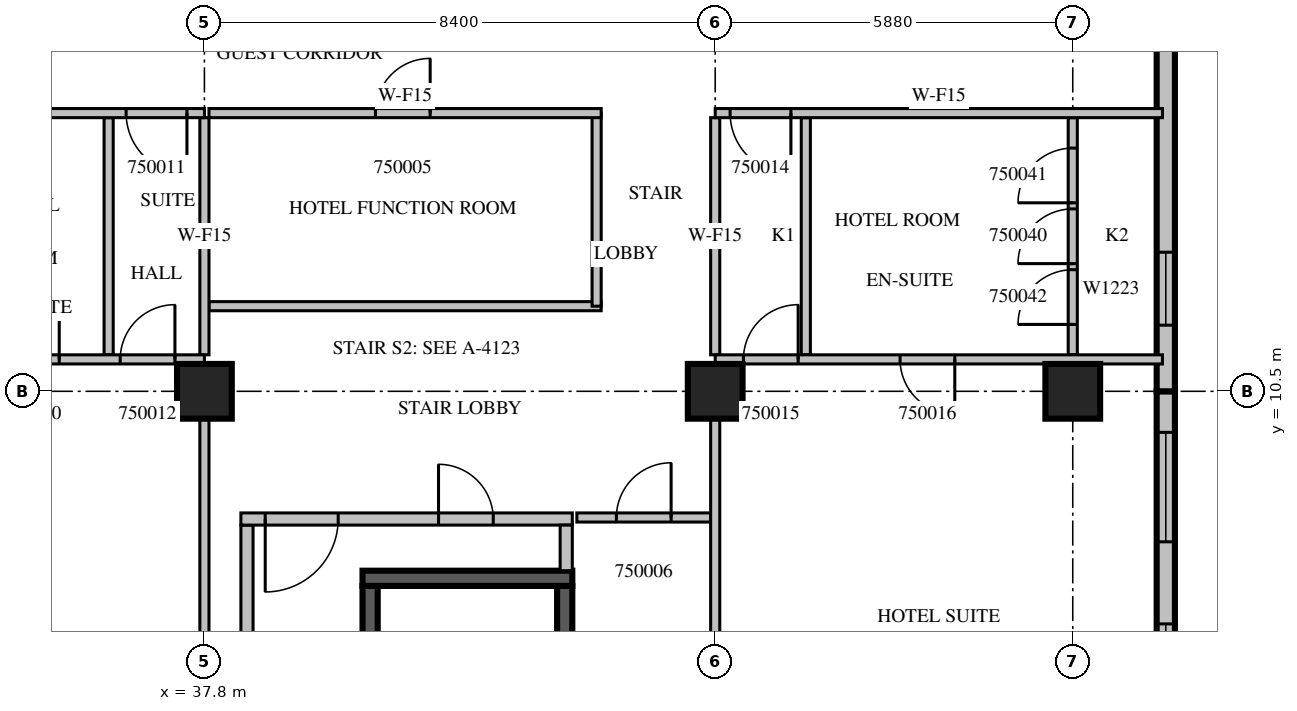
"""IFC4 building model, lengths in metres.
Left out: names, types, materials, properties, quantities, classifications, styles, units other than length and angle.
Written with IfcOpenShell. Run it as: python <this file> out.ifc"""

import sys

from ifc_helpers import new_model, si_unit, direction, frame, frame_2d, origin, origin_2d, place, context, subcontext, project, spatial, rectangle, extrude, source, transform, mapped, element, fill, save


model = new_model("IFC4")
c1 = context("Model", 3, precision=1e-05, world=origin(), true_north=direction((0.0, 1.0)))
c2 = subcontext(c1, "Body", "Model", "MODEL_VIEW")
j1 = project(units=[si_unit("LENGTHUNIT", "METRE"), si_unit("PLANEANGLEUNIT", "RADIAN")], contexts=[c1])
p1 = place(None, origin())
s1 = spatial("IfcSite", under=j1, at=p1, CompositionType="ELEMENT")
p2 = place(p1, origin())
s2 = spatial("IfcBuilding", under=s1, at=p2, CompositionType="ELEMENT")
p3 = place(p2, frame((0.0, 0.0, 223.4)))
s3 = spatial("IfcBuildingStorey", under=s2, at=p3, CompositionType="ELEMENT", Elevation=223.4)
m1 = source(origin(), c2, "Body", "SweptSolid", [
    extrude(rectangle(XDim=0.9, YDim=0.9, at=origin_2d()), origin(), (0.0, 0.0, 1.0), 3.8),
])
for number, where, z_axis, x_axis in (
    (1, (37.8, 10.5, 0.0), (0.0, 0.0, 1.0), (1.0, 0.0, 0.0)),
    (2, (46.2, 10.5, 0.0), (0.0, 0.0, 1.0), (1.0, 0.0, 0.0)),
    (3, (52.08, 10.5, 0.0), (0.0, 0.0, 1.0), (1.0, 0.0, 0.0)),
):
    element("IfcColumn", number, at=place(p3, frame(where, z_axis=z_axis, x_axis=x_axis)), inside=s3, PredefinedType="COLUMN", context=c2, shape_type="MappedRepresentation", body=[
        mapped(m1, transform((0.0, 0.0, 0.0), scale=1.0)),
    ])
m2 = source(origin(), c2, "Body", "SweptSolid", [
    extrude(rectangle(XDim=6.3, YDim=0.3, at=frame_2d((3.15, 0.0))), origin(), (0.0, 0.0, 1.0), 3.4),
])
p4 = place(p3, frame((53.61, 4.2, 0.0), z_axis=(0.0, 0.0, 1.0), x_axis=(0.0, 1.0, 0.0)))
e4 = element("IfcWall", 4, at=p4, inside=s3, PredefinedType="STANDARD", context=c2, shape_type="MappedRepresentation", body=[
    mapped(m2, transform((0.0, 0.0, 0.0), scale=1.0)),
])
m3 = source(origin(), c2, "Body", "SweptSolid", [
    extrude(rectangle(XDim=1.8, YDim=2.3, at=frame_2d((0.9, 1.15))), frame((0.0, 0.16, 0.0), z_axis=(0.0, -1.0, 0.0), x_axis=(1.0, 0.0, 0.0)), (0.0, 0.0, 1.0), 0.32),
])
p5 = place(p4, frame((0.675, 0.0, 0.6)))
e5 = element("IfcOpeningElement", 5, at=p5, cuts=e4, PredefinedType="OPENING", context=c2, shape_type="MappedRepresentation", body=[
    mapped(m3, transform((0.0, 0.0, 0.0), scale=1.0)),
])
p6 = place(p4, frame((3.825, 0.0, 0.6)))
e6 = element("IfcOpeningElement", 6, at=p6, cuts=e4, PredefinedType="OPENING", context=c2, shape_type="MappedRepresentation", body=[
    mapped(m3, transform((0.0, 0.0, 0.0), scale=1.0)),
])
m4 = source(origin(), c2, "Body", "SweptSolid", [
    extrude(rectangle(XDim=6.75, YDim=0.3, at=frame_2d((3.375, 0.0))), origin(), (0.0, 0.0, 1.0), 3.4),
])
p7 = place(p3, frame((53.61, 10.5, 0.0), z_axis=(0.0, 0.0, 1.0), x_axis=(0.0, 1.0, 0.0)))
e7 = element("IfcWall", 7, at=p7, inside=s3, PredefinedType="STANDARD", context=c2, shape_type="MappedRepresentation", body=[
    mapped(m4, transform((0.0, 0.0, 0.0), scale=1.0)),
])
m5 = source(origin(), c2, "Body", "SweptSolid", [
    extrude(rectangle(XDim=1.2, YDim=2.3, at=frame_2d((0.6, 1.15))), frame((0.0, 0.16, 0.0), z_axis=(0.0, -1.0, 0.0), x_axis=(1.0, 0.0, 0.0)), (0.0, 0.0, 1.0), 0.32),
])
p8 = place(p7, frame((1.087, 0.0, 0.6)))
e8 = element("IfcOpeningElement", 8, at=p8, cuts=e7, PredefinedType="OPENING", context=c2, shape_type="MappedRepresentation", body=[
    mapped(m5, transform((0.0, 0.0, 0.0), scale=1.0)),
])
m6 = source(origin(), c2, "Body", "SweptSolid", [
    extrude(rectangle(XDim=7.0, YDim=0.25, at=frame_2d((3.5, 0.0))), origin(), (0.0, 0.0, 1.0), 3.4),
])
p9 = place(p3, frame((40.525, 0.3, 0.0), z_axis=(0.0, 0.0, 1.0), x_axis=(0.0, 1.0, 0.0)))
e9 = element("IfcWall", 9, at=p9, inside=s3, PredefinedType="SOLIDWALL", context=c2, shape_type="MappedRepresentation", body=[
    mapped(m6, transform((0.0, 0.0, 0.0), scale=1.0)),
])
m7 = source(origin(), c2, "Body", "SweptSolid", [
    extrude(rectangle(XDim=1.1, YDim=2.1, at=frame_2d((0.55, 1.05))), frame((0.0, 0.135, 0.0), z_axis=(0.0, -1.0, 0.0), x_axis=(1.0, 0.0, 0.0)), (0.0, 0.0, 1.0), 0.27),
])
p10 = place(p9, frame((0.55, 0.0, 0.0)))
e10 = element("IfcOpeningElement", 10, at=p10, cuts=e9, PredefinedType="OPENING", context=c2, shape_type="MappedRepresentation", body=[
    mapped(m7, transform((0.0, 0.0, 0.0), scale=1.0)),
])
p11 = place(p3, frame((43.725, 0.3, 0.0), z_axis=(0.0, 0.0, 1.0), x_axis=(0.0, 1.0, 0.0)))
e11 = element("IfcWall", 11, at=p11, inside=s3, PredefinedType="SOLIDWALL", context=c2, shape_type="MappedRepresentation", body=[
    mapped(m6, transform((0.0, 0.0, 0.0), scale=1.0)),
])
m8 = source(origin(), c2, "Body", "SweptSolid", [
    extrude(rectangle(XDim=3.45, YDim=0.25, at=frame_2d((1.725, 0.0))), origin(), (0.0, 0.0, 1.0), 3.4),
])
p12 = place(p3, frame((40.4, 7.425, 0.0), z_axis=(0.0, 0.0, 1.0), x_axis=(1.0, 0.0, 0.0)))
e12 = element("IfcWall", 12, at=p12, inside=s3, PredefinedType="SOLIDWALL", context=c2, shape_type="MappedRepresentation", body=[
    mapped(m8, transform((0.0, 0.0, 0.0), scale=1.0)),
])
m9 = source(origin(), c2, "Body", "SweptSolid", [
    extrude(rectangle(XDim=8.0, YDim=0.2, at=frame_2d((4.0, 0.0))), origin(), (0.0, 0.0, 1.0), 3.4),
])
p13 = place(p3, frame((38.5, 0.3, 0.0), z_axis=(0.0, 0.0, 1.0), x_axis=(0.0, 1.0, 0.0)))
e13 = element("IfcWall", 13, at=p13, inside=s3, PredefinedType="PARTITIONING", context=c2, shape_type="MappedRepresentation", body=[
    mapped(m9, transform((0.0, 0.0, 0.0), scale=1.0)),
])
m10 = source(origin(), c2, "Body", "SweptSolid", [
    extrude(rectangle(XDim=5.45, YDim=0.2, at=frame_2d((2.725, 0.0))), origin(), (0.0, 0.0, 1.0), 3.4),
])
p14 = place(p3, frame((38.4, 8.4, 0.0), z_axis=(0.0, 0.0, 1.0), x_axis=(1.0, 0.0, 0.0)))
e14 = element("IfcWall", 14, at=p14, inside=s3, PredefinedType="PARTITIONING", context=c2, shape_type="MappedRepresentation", body=[
    mapped(m10, transform((0.0, 0.0, 0.0), scale=1.0)),
])
m11 = source(origin(), c2, "Body", "SweptSolid", [
    extrude(rectangle(XDim=1.2, YDim=2.1, at=frame_2d((0.6, 1.05))), frame((0.0, 0.11, 0.0), z_axis=(0.0, -1.0, 0.0), x_axis=(1.0, 0.0, 0.0)), (0.0, 0.0, 1.0), 0.22),
])
p15 = place(p14, frame((0.4, 0.0, 0.0)))
e15 = element("IfcOpeningElement", 15, at=p15, cuts=e14, PredefinedType="OPENING", context=c2, shape_type="MappedRepresentation", body=[
    mapped(m11, transform((0.0, 0.0, 0.0), scale=1.0)),
])
m12 = source(origin(), c2, "Body", "SweptSolid", [
    extrude(rectangle(XDim=0.9, YDim=2.1, at=frame_2d((0.45, 1.05))), frame((0.0, 0.11, 0.0), z_axis=(0.0, -1.0, 0.0), x_axis=(1.0, 0.0, 0.0)), (0.0, 0.0, 1.0), 0.22),
])
p16 = place(p14, frame((3.25, 0.0, 0.0)))
e16 = element("IfcOpeningElement", 16, at=p16, cuts=e14, PredefinedType="OPENING", context=c2, shape_type="MappedRepresentation", body=[
    mapped(m12, transform((0.0, 0.0, 0.0), scale=1.0)),
])
m13 = source(origin(), c2, "Body", "SweptSolid", [
    extrude(rectangle(XDim=0.75, YDim=0.2, at=frame_2d((0.375, 0.0))), origin(), (0.0, 0.0, 1.0), 3.4),
])
p17 = place(p3, frame((43.75, 7.55, 0.0), z_axis=(0.0, 0.0, 1.0), x_axis=(0.0, 1.0, 0.0)))
e17 = element("IfcWall", 17, at=p17, inside=s3, PredefinedType="PARTITIONING", context=c2, shape_type="MappedRepresentation", body=[
    mapped(m13, transform((0.0, 0.0, 0.0), scale=1.0)),
])
m14 = source(origin(), c2, "Body", "SweptSolid", [
    extrude(rectangle(XDim=6.45, YDim=0.15, at=frame_2d((3.225, 0.0))), origin(), (0.0, 0.0, 1.0), 3.4),
])
p18 = place(p3, frame((37.875, 11.9, 0.0), z_axis=(0.0, 0.0, 1.0), x_axis=(1.0, 0.0, 0.0)))
e18 = element("IfcWall", 18, at=p18, inside=s3, PredefinedType="PARTITIONING", context=c2, shape_type="MappedRepresentation", body=[
    mapped(m14, transform((0.0, 0.0, 0.0), scale=1.0)),
])
m15 = source(origin(), c2, "Body", "SweptSolid", [
    extrude(rectangle(XDim=3.175, YDim=0.15, at=frame_2d((1.587, 0.0))), origin(), (0.0, 0.0, 1.0), 3.4),
])
p19 = place(p3, frame((44.25, 11.9, 0.0), z_axis=(0.0, 0.0, 1.0), x_axis=(0.0, 1.0, 0.0)))
e19 = element("IfcWall", 19, at=p19, inside=s3, PredefinedType="PARTITIONING", context=c2, shape_type="MappedRepresentation", body=[
    mapped(m15, transform((0.0, 0.0, 0.0), scale=1.0)),
])
p20 = place(p3, frame((44.325, 15.075, 0.0), z_axis=(0.0, 0.0, 1.0), x_axis=(-1.0, 0.0, 0.0)))
e20 = element("IfcWall", 20, at=p20, inside=s3, PredefinedType="PARTITIONING", context=c2, shape_type="MappedRepresentation", body=[
    mapped(m14, transform((0.0, 0.0, 0.0), scale=1.0)),
])
m16 = source(origin(), c2, "Body", "SweptSolid", [
    extrude(rectangle(XDim=0.9, YDim=2.1, at=frame_2d((0.45, 1.05))), frame((0.0, 0.085, 0.0), z_axis=(0.0, -1.0, 0.0), x_axis=(1.0, 0.0, 0.0)), (0.0, 0.0, 1.0), 0.17),
])
p21 = place(p20, frame((2.812, 0.0, 0.0)))
e21 = element("IfcOpeningElement", 21, at=p21, cuts=e20, PredefinedType="OPENING", context=c2, shape_type="MappedRepresentation", body=[
    mapped(m16, transform((0.0, 0.0, 0.0), scale=1.0)),
])
m17 = source(origin(), c2, "Body", "SweptSolid", [
    extrude(rectangle(XDim=2.2, YDim=0.15, at=frame_2d((1.1, 0.0))), origin(), (0.0, 0.0, 1.0), 3.4),
])
p22 = place(p3, frame((46.125, 8.425, 0.0), z_axis=(0.0, 0.0, 1.0), x_axis=(-1.0, 0.0, 0.0)))
e22 = element("IfcWall", 22, at=p22, inside=s3, PredefinedType="PARTITIONING", context=c2, shape_type="MappedRepresentation", body=[
    mapped(m17, transform((0.0, 0.0, 0.0), scale=1.0)),
])
p23 = place(p22, frame((0.65, 0.0, 0.0)))
e23 = element("IfcOpeningElement", 23, at=p23, cuts=e22, PredefinedType="OPENING", context=c2, shape_type="MappedRepresentation", body=[
    mapped(m16, transform((0.0, 0.0, 0.0), scale=1.0)),
])
m18 = source(origin(), c2, "Body", "SweptSolid", [
    extrude(rectangle(XDim=3.9, YDim=0.15, at=frame_2d((1.95, 0.0))), origin(), (0.0, 0.0, 1.0), 3.4),
])
p24 = place(p3, frame((36.225, 11.1, 0.0), z_axis=(0.0, 0.0, 1.0), x_axis=(0.0, 1.0, 0.0)))
e24 = element("IfcWall", 24, at=p24, inside=s3, PredefinedType="PARTITIONING", context=c2, shape_type="MappedRepresentation", body=[
    mapped(m18, transform((0.0, 0.0, 0.0), scale=1.0)),
])
m19 = source(origin(), c2, "Body", "SweptSolid", [
    extrude(rectangle(XDim=9.152, YDim=0.15, at=frame_2d((4.576, 0.0))), origin(), (0.0, 0.0, 1.0), 3.4),
])
p25 = place(p3, frame((37.8, 0.899, 0.0), z_axis=(0.0, 0.0, 1.0), x_axis=(0.0, 1.0, 0.0)))
e25 = element("IfcWall", 25, at=p25, inside=s3, PredefinedType="PARTITIONING", context=c2, shape_type="MappedRepresentation", body=[
    mapped(m19, transform((0.0, 0.0, 0.0), scale=1.0)),
])
p26 = place(p3, frame((37.8, 11.1, 0.0), z_axis=(0.0, 0.0, 1.0), x_axis=(0.0, 1.0, 0.0)))
e26 = element("IfcWall", 26, at=p26, inside=s3, PredefinedType="PARTITIONING", context=c2, shape_type="MappedRepresentation", body=[
    mapped(m18, transform((0.0, 0.0, 0.0), scale=1.0)),
])
m20 = source(origin(), c2, "Body", "SweptSolid", [
    extrude(rectangle(XDim=8.4, YDim=0.15, at=frame_2d((4.2, 0.0))), origin(), (0.0, 0.0, 1.0), 3.4),
])
p27 = place(p3, frame((37.8, 11.025, 0.0), z_axis=(0.0, 0.0, 1.0), x_axis=(-1.0, 0.0, 0.0)))
e27 = element("IfcWall", 27, at=p27, inside=s3, PredefinedType="PARTITIONING", context=c2, shape_type="MappedRepresentation", body=[
    mapped(m20, transform((0.0, 0.0, 0.0), scale=1.0)),
])
p28 = place(p27, frame((7.025, 0.0, 0.0)))
e28 = element("IfcOpeningElement", 28, at=p28, cuts=e27, PredefinedType="OPENING", context=c2, shape_type="MappedRepresentation", body=[
    mapped(m16, transform((0.0, 0.0, 0.0), scale=1.0)),
])
p29 = place(p27, frame((5.013, 0.0, 0.0)))
e29 = element("IfcOpeningElement", 29, at=p29, cuts=e27, PredefinedType="OPENING", context=c2, shape_type="MappedRepresentation", body=[
    mapped(m16, transform((0.0, 0.0, 0.0), scale=1.0)),
])
p30 = place(p27, frame((2.388, 0.0, 0.0)))
e30 = element("IfcOpeningElement", 30, at=p30, cuts=e27, PredefinedType="OPENING", context=c2, shape_type="MappedRepresentation", body=[
    mapped(m16, transform((0.0, 0.0, 0.0), scale=1.0)),
])
p31 = place(p27, frame((0.485, 0.0, 0.0)))
e31 = element("IfcOpeningElement", 31, at=p31, cuts=e27, PredefinedType="OPENING", context=c2, shape_type="MappedRepresentation", body=[
    mapped(m16, transform((0.0, 0.0, 0.0), scale=1.0)),
])
p32 = place(p3, frame((47.69, 11.1, 0.0), z_axis=(0.0, 0.0, 1.0), x_axis=(0.0, 1.0, 0.0)))
e32 = element("IfcWall", 32, at=p32, inside=s3, PredefinedType="PARTITIONING", context=c2, shape_type="MappedRepresentation", body=[
    mapped(m18, transform((0.0, 0.0, 0.0), scale=1.0)),
])
p33 = place(p3, frame((52.08, 11.1, 0.0), z_axis=(0.0, 0.0, 1.0), x_axis=(0.0, 1.0, 0.0)))
e33 = element("IfcWall", 33, at=p33, inside=s3, PredefinedType="PARTITIONING", context=c2, shape_type="MappedRepresentation", body=[
    mapped(m18, transform((0.0, 0.0, 0.0), scale=1.0)),
])
p34 = place(p33, frame((1.5, 0.0, 0.0)))
e34 = element("IfcOpeningElement", 34, at=p34, cuts=e33, PredefinedType="OPENING", context=c2, shape_type="MappedRepresentation", body=[
    mapped(m16, transform((0.0, 0.0, 0.0), scale=1.0)),
])
p35 = place(p33, frame((2.5, 0.0, 0.0)))
e35 = element("IfcOpeningElement", 35, at=p35, cuts=e33, PredefinedType="OPENING", context=c2, shape_type="MappedRepresentation", body=[
    mapped(m16, transform((0.0, 0.0, 0.0), scale=1.0)),
])
p36 = place(p33, frame((0.5, 0.0, 0.0)))
e36 = element("IfcOpeningElement", 36, at=p36, cuts=e33, PredefinedType="OPENING", context=c2, shape_type="MappedRepresentation", body=[
    mapped(m16, transform((0.0, 0.0, 0.0), scale=1.0)),
])
p37 = place(p3, frame((46.2, 0.899, 0.0), z_axis=(0.0, 0.0, 1.0), x_axis=(0.0, 1.0, 0.0)))
e37 = element("IfcWall", 37, at=p37, inside=s3, PredefinedType="PARTITIONING", context=c2, shape_type="MappedRepresentation", body=[
    mapped(m19, transform((0.0, 0.0, 0.0), scale=1.0)),
])
p38 = place(p3, frame((46.2, 11.1, 0.0), z_axis=(0.0, 0.0, 1.0), x_axis=(0.0, 1.0, 0.0)))
e38 = element("IfcWall", 38, at=p38, inside=s3, PredefinedType="PARTITIONING", context=c2, shape_type="MappedRepresentation", body=[
    mapped(m18, transform((0.0, 0.0, 0.0), scale=1.0)),
])
m21 = source(origin(), c2, "Body", "SweptSolid", [
    extrude(rectangle(XDim=7.355, YDim=0.15, at=frame_2d((3.678, 0.0))), origin(), (0.0, 0.0, 1.0), 3.4),
])
p39 = place(p3, frame((53.555, 11.025, 0.0), z_axis=(0.0, 0.0, 1.0), x_axis=(-1.0, 0.0, 0.0)))
e39 = element("IfcWall", 39, at=p39, inside=s3, PredefinedType="PARTITIONING", context=c2, shape_type="MappedRepresentation", body=[
    mapped(m21, transform((0.0, 0.0, 0.0), scale=1.0)),
])
p40 = place(p39, frame((5.991, 0.0, 0.0)))
e40 = element("IfcOpeningElement", 40, at=p40, cuts=e39, PredefinedType="OPENING", context=c2, shape_type="MappedRepresentation", body=[
    mapped(m16, transform((0.0, 0.0, 0.0), scale=1.0)),
])
p41 = place(p39, frame((3.415, 0.0, 0.0)))
e41 = element("IfcOpeningElement", 41, at=p41, cuts=e39, PredefinedType="OPENING", context=c2, shape_type="MappedRepresentation", body=[
    mapped(m16, transform((0.0, 0.0, 0.0), scale=1.0)),
])
p42 = place(p3, frame((37.8, 15.075, 0.0), z_axis=(0.0, 0.0, 1.0), x_axis=(-1.0, 0.0, 0.0)))
e42 = element("IfcWall", 42, at=p42, inside=s3, PredefinedType="PARTITIONING", context=c2, shape_type="MappedRepresentation", body=[
    mapped(m20, transform((0.0, 0.0, 0.0), scale=1.0)),
])
m22 = source(origin(), c2, "Body", "SweptSolid", [
    extrude(rectangle(XDim=1.0, YDim=2.1, at=frame_2d((0.5, 1.05))), frame((0.0, 0.085, 0.0), z_axis=(0.0, -1.0, 0.0), x_axis=(1.0, 0.0, 0.0)), (0.0, 0.0, 1.0), 0.17),
])
p43 = place(p42, frame((7.112, 0.0, 0.0)))
e43 = element("IfcOpeningElement", 43, at=p43, cuts=e42, PredefinedType="OPENING", context=c2, shape_type="MappedRepresentation", body=[
    mapped(m22, transform((0.0, 0.0, 0.0), scale=1.0)),
])
p44 = place(p42, frame((0.287, 0.0, 0.0)))
e44 = element("IfcOpeningElement", 44, at=p44, cuts=e42, PredefinedType="OPENING", context=c2, shape_type="MappedRepresentation", body=[
    mapped(m22, transform((0.0, 0.0, 0.0), scale=1.0)),
])
p45 = place(p3, frame((53.555, 15.075, 0.0), z_axis=(0.0, 0.0, 1.0), x_axis=(-1.0, 0.0, 0.0)))
e45 = element("IfcWall", 45, at=p45, inside=s3, PredefinedType="PARTITIONING", context=c2, shape_type="MappedRepresentation", body=[
    mapped(m21, transform((0.0, 0.0, 0.0), scale=1.0)),
])
p46 = place(p45, frame((6.11, 0.0, 0.0)))
e46 = element("IfcOpeningElement", 46, at=p46, cuts=e45, PredefinedType="OPENING", context=c2, shape_type="MappedRepresentation", body=[
    mapped(m22, transform((0.0, 0.0, 0.0), scale=1.0)),
])
m23 = source(origin(), c2, "Body", "SweptSolid", [
    extrude(rectangle(XDim=1.8, YDim=2.3, at=frame_2d((0.9, 1.15))), frame((0.0, 0.03, 0.0), z_axis=(0.0, -1.0, 0.0), x_axis=(1.0, 0.0, 0.0)), (0.0, 0.0, 1.0), 0.06),
])
p47 = place(p5, origin())
e47 = element("IfcWindow", 47, at=p47, inside=s3, PartitioningType="SINGLE_PANEL", PredefinedType="WINDOW", context=c2, shape_type="MappedRepresentation", body=[
    mapped(m23, transform((0.0, 0.0, 0.0), scale=1.0)),
])
fill(e5, e47)
p48 = place(p6, origin())
e48 = element("IfcWindow", 48, at=p48, inside=s3, PartitioningType="SINGLE_PANEL", PredefinedType="WINDOW", context=c2, shape_type="MappedRepresentation", body=[
    mapped(m23, transform((0.0, 0.0, 0.0), scale=1.0)),
])
fill(e6, e48)
m24 = source(origin(), c2, "Body", "SweptSolid", [
    extrude(rectangle(XDim=1.2, YDim=2.3, at=frame_2d((0.6, 1.15))), frame((0.0, 0.03, 0.0), z_axis=(0.0, -1.0, 0.0), x_axis=(1.0, 0.0, 0.0)), (0.0, 0.0, 1.0), 0.06),
])
p49 = place(p8, origin())
e49 = element("IfcWindow", 49, at=p49, inside=s3, PartitioningType="SINGLE_PANEL", PredefinedType="WINDOW", context=c2, shape_type="MappedRepresentation", body=[
    mapped(m24, transform((0.0, 0.0, 0.0), scale=1.0)),
])
fill(e8, e49)
m25 = source(origin(), c2, "Body", "SweptSolid", [
    extrude(rectangle(XDim=1.2, YDim=2.1, at=frame_2d((0.6, 1.05))), frame((0.0, 0.025, 0.0), z_axis=(0.0, -1.0, 0.0), x_axis=(1.0, 0.0, 0.0)), (0.0, 0.0, 1.0), 0.05),
])
p50 = place(p15, origin())
e50 = element("IfcDoor", 50, at=p50, inside=s3, OperationType="SINGLE_SWING_RIGHT", PredefinedType="DOOR", context=c2, shape_type="MappedRepresentation", body=[
    mapped(m25, transform((0.0, 0.0, 0.0), scale=1.0)),
])
fill(e15, e50)
m26 = source(origin(), c2, "Body", "SweptSolid", [
    extrude(rectangle(XDim=0.9, YDim=2.1, at=frame_2d((0.45, 1.05))), frame((0.0, 0.025, 0.0), z_axis=(0.0, -1.0, 0.0), x_axis=(1.0, 0.0, 0.0)), (0.0, 0.0, 1.0), 0.05),
])
p51 = place(p16, origin())
e51 = element("IfcDoor", 51, at=p51, inside=s3, OperationType="SINGLE_SWING_LEFT", PredefinedType="DOOR", context=c2, shape_type="MappedRepresentation", body=[
    mapped(m26, transform((0.0, 0.0, 0.0), scale=1.0)),
])
fill(e16, e51)
p52 = place(p21, origin())
e52 = element("IfcDoor", 52, at=p52, inside=s3, OperationType="SINGLE_SWING_RIGHT", PredefinedType="DOOR", context=c2, shape_type="MappedRepresentation", body=[
    mapped(m26, transform((0.0, 0.0, 0.0), scale=1.0)),
])
fill(e21, e52)
p53 = place(p23, origin())
e53 = element("IfcDoor", 53, at=p53, inside=s3, OperationType="SINGLE_SWING_RIGHT", PredefinedType="DOOR", context=c2, shape_type="MappedRepresentation", body=[
    mapped(m26, transform((0.0, 0.0, 0.0), scale=1.0)),
])
fill(e23, e53)
p54 = place(p30, origin())
e54 = element("IfcDoor", 54, at=p54, inside=s3, OperationType="SINGLE_SWING_RIGHT", PredefinedType="DOOR", context=c2, shape_type="MappedRepresentation", body=[
    mapped(m26, transform((0.0, 0.0, 0.0), scale=1.0)),
])
fill(e30, e54)
m27 = source(origin(), c2, "Body", "SweptSolid", [
    extrude(rectangle(XDim=1.0, YDim=2.1, at=frame_2d((0.5, 1.05))), frame((0.0, 0.025, 0.0), z_axis=(0.0, -1.0, 0.0), x_axis=(1.0, 0.0, 0.0)), (0.0, 0.0, 1.0), 0.05),
])
p55 = place(p44, origin())
e55 = element("IfcDoor", 55, at=p55, inside=s3, OperationType="SINGLE_SWING_LEFT", PredefinedType="DOOR", context=c2, shape_type="MappedRepresentation", body=[
    mapped(m27, transform((0.0, 0.0, 0.0), scale=1.0)),
])
fill(e44, e55)
p56 = place(p31, origin())
e56 = element("IfcDoor", 56, at=p56, inside=s3, OperationType="SINGLE_SWING_RIGHT", PredefinedType="DOOR", context=c2, shape_type="MappedRepresentation", body=[
    mapped(m26, transform((0.0, 0.0, 0.0), scale=1.0)),
])
fill(e31, e56)
p57 = place(p46, origin())
e57 = element("IfcDoor", 57, at=p57, inside=s3, OperationType="SINGLE_SWING_LEFT", PredefinedType="DOOR", context=c2, shape_type="MappedRepresentation", body=[
    mapped(m27, transform((0.0, 0.0, 0.0), scale=1.0)),
])
fill(e46, e57)
p58 = place(p40, origin())
e58 = element("IfcDoor", 58, at=p58, inside=s3, OperationType="SINGLE_SWING_RIGHT", PredefinedType="DOOR", context=c2, shape_type="MappedRepresentation", body=[
    mapped(m26, transform((0.0, 0.0, 0.0), scale=1.0)),
])
fill(e40, e58)
p59 = place(p41, origin())
e59 = element("IfcDoor", 59, at=p59, inside=s3, OperationType="SINGLE_SWING_LEFT", PredefinedType="DOOR", context=c2, shape_type="MappedRepresentation", body=[
    mapped(m26, transform((0.0, 0.0, 0.0), scale=1.0)),
])
fill(e41, e59)
p60 = place(p34, origin())
e60 = element("IfcDoor", 60, at=p60, inside=s3, OperationType="SINGLE_SWING_LEFT", PredefinedType="DOOR", context=c2, shape_type="MappedRepresentation", body=[
    mapped(m26, transform((0.0, 0.0, 0.0), scale=1.0)),
])
fill(e34, e60)
p61 = place(p35, origin())
e61 = element("IfcDoor", 61, at=p61, inside=s3, OperationType="SINGLE_SWING_LEFT", PredefinedType="DOOR", context=c2, shape_type="MappedRepresentation", body=[
    mapped(m26, transform((0.0, 0.0, 0.0), scale=1.0)),
])
fill(e35, e61)
p62 = place(p36, origin())
e62 = element("IfcDoor", 62, at=p62, inside=s3, OperationType="SINGLE_SWING_LEFT", PredefinedType="DOOR", context=c2, shape_type="MappedRepresentation", body=[
    mapped(m26, transform((0.0, 0.0, 0.0), scale=1.0)),
])
fill(e36, e62)
save(model, sys.argv[1])
